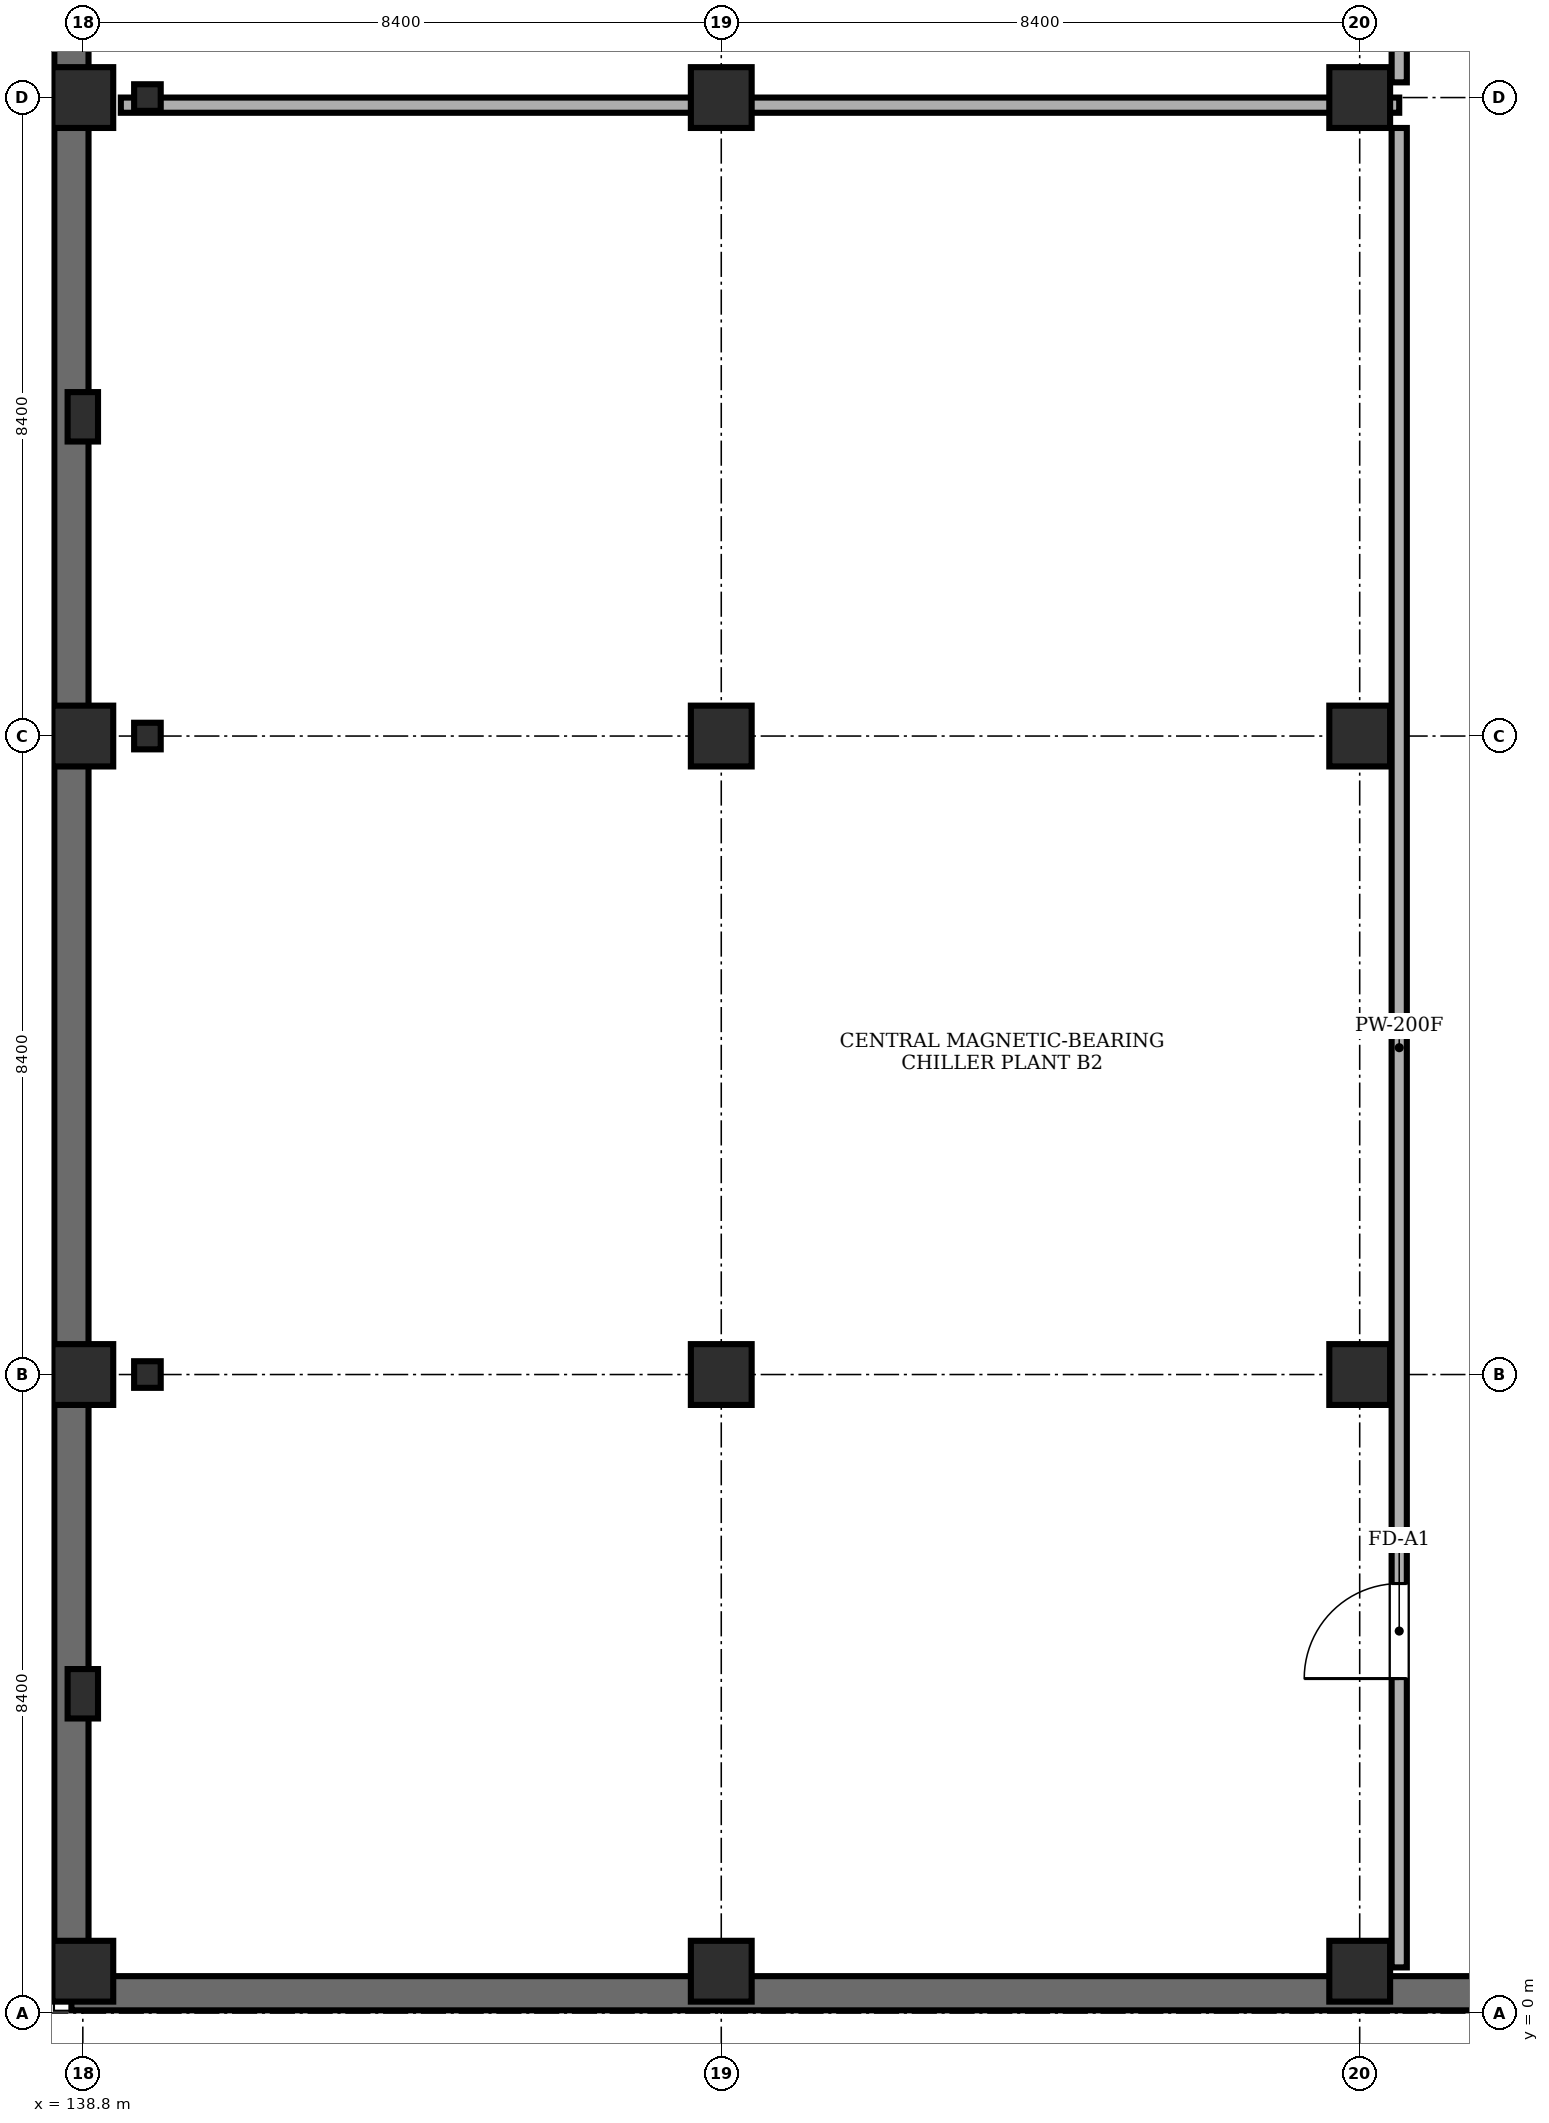
"""IFC4 building model, lengths in metres.
Left out: names, types, materials, properties, quantities, classifications, styles, units other than length and angle.
Written with IfcOpenShell. Run it as: python <this file> out.ifc"""

import sys

from ifc_helpers import new_model, si_unit, direction, frame, frame_2d, origin, origin_2d, place, context, subcontext, project, spatial, rectangle, i_section, extrude, element, fill, save


model = new_model("IFC4")
c1 = context("Model", 3, precision=1e-05, world=origin(), true_north=direction((0.0, 1.0)))
c2 = subcontext(c1, "Body", "Model", "MODEL_VIEW")
j1 = project(units=[si_unit("LENGTHUNIT", "METRE"), si_unit("PLANEANGLEUNIT", "RADIAN")], contexts=[c1])
p1 = place(None, origin())
s1 = spatial("IfcSite", under=j1, at=p1, CompositionType="ELEMENT")
p2 = place(p1, origin())
s2 = spatial("IfcBuilding", under=s1, at=p2, CompositionType="ELEMENT")
p3 = place(p2, frame((0.0, 0.0, -9.6)))
s3 = spatial("IfcBuildingStorey", under=s2, at=p3, CompositionType="ELEMENT", Elevation=-9.6)
for number, where, z_axis, x_axis in (
    (1, (138.8, 0.55, 0.0), (0.0, 0.0, 1.0), (1.0, 0.0, 0.0)),
    (2, (138.8, 8.4, 0.0), (0.0, 0.0, 1.0), (1.0, 0.0, 0.0)),
    (3, (138.8, 16.8, 0.0), (0.0, 0.0, 1.0), (1.0, 0.0, 0.0)),
    (4, (138.8, 25.2, 0.0), (0.0, 0.0, 1.0), (1.0, 0.0, 0.0)),
    (5, (147.2, 0.55, 0.0), (0.0, 0.0, 1.0), (1.0, 0.0, 0.0)),
    (6, (147.2, 8.4, 0.0), (0.0, 0.0, 1.0), (1.0, 0.0, 0.0)),
    (7, (147.2, 16.8, 0.0), (0.0, 0.0, 1.0), (1.0, 0.0, 0.0)),
    (8, (147.2, 25.2, 0.0), (0.0, 0.0, 1.0), (1.0, 0.0, 0.0)),
    (9, (155.6, 0.55, 0.0), (0.0, 0.0, 1.0), (1.0, 0.0, 0.0)),
    (10, (155.6, 8.4, 0.0), (0.0, 0.0, 1.0), (1.0, 0.0, 0.0)),
    (11, (155.6, 16.8, 0.0), (0.0, 0.0, 1.0), (1.0, 0.0, 0.0)),
    (12, (155.6, 25.2, 0.0), (0.0, 0.0, 1.0), (1.0, 0.0, 0.0)),
):
    element("IfcColumn", number, at=place(p3, frame(where, z_axis=z_axis, x_axis=x_axis)), inside=s3, PredefinedType="COLUMN", context=c2, shape_type="SweptSolid", body=[
        extrude(rectangle(XDim=0.8, YDim=0.8, at=origin_2d()), origin(), (0.0, 0.0, 1.0), 4.48),
    ])
for number, where, z_axis, x_axis in (
    (13, (138.8, 4.2, 0.0), (0.0, 0.0, 1.0), (1.0, 0.0, 0.0)),
    (14, (138.8, 21.0, 0.0), (0.0, 0.0, 1.0), (1.0, 0.0, 0.0)),
):
    element("IfcColumn", number, at=place(p3, frame(where, z_axis=z_axis, x_axis=x_axis)), inside=s3, PredefinedType="PILASTER", context=c2, shape_type="SweptSolid", body=[
        extrude(rectangle(XDim=0.4, YDim=0.65, at=origin_2d()), origin(), (0.0, 0.0, 1.0), 4.48),
    ])
p4 = place(p3, frame((138.65, 78.25, 0.0), z_axis=(0.0, 0.0, 1.0), x_axis=(0.0, -1.0, 0.0)))
e15 = element("IfcWall", 15, at=p4, inside=s3, PredefinedType="SHEAR", context=c2, shape_type="SweptSolid", body=[
    extrude(rectangle(XDim=77.99, YDim=0.45, at=frame_2d((38.995, 0.0))), origin(), (0.0, 0.0, 1.0), 3.7),
])
p5 = place(p3, frame((138.65, 0.26, 0.0), z_axis=(0.0, 0.0, 1.0), x_axis=(1.0, 0.0, 0.0)))
e16 = element("IfcWall", 16, at=p5, inside=s3, PredefinedType="SHEAR", context=c2, shape_type="SweptSolid", body=[
    extrude(rectangle(XDim=25.09, YDim=0.45, at=frame_2d((12.545, 0.0))), origin(), (0.0, 0.0, 1.0), 3.7),
])
for number, where, z_axis, x_axis in (
    (17, (139.65, 8.4, 0.0), (0.0, 0.0, 1.0), (1.0, 0.0, 0.0)),
    (18, (139.65, 16.8, 0.0), (0.0, 0.0, 1.0), (1.0, 0.0, 0.0)),
    (19, (139.65, 25.2, 0.0), (0.0, 0.0, 1.0), (1.0, 0.0, 0.0)),
):
    element("IfcColumn", number, at=place(p3, frame(where, z_axis=z_axis, x_axis=x_axis)), inside=s3, PredefinedType="COLUMN", context=c2, shape_type="SweptSolid", body=[
        extrude(i_section(OverallWidth=0.35, OverallDepth=0.35, WebThickness=0.012, FlangeThickness=0.019, at=origin_2d()), origin(), (0.0, 0.0, 1.0), 4.48),
    ])
p6 = place(p3, frame((156.12, 0.6, 0.0), z_axis=(0.0, 0.0, 1.0), x_axis=(0.0, 1.0, 0.0)))
e20 = element("IfcWall", 20, at=p6, inside=s3, PredefinedType="SOLIDWALL", context=c2, shape_type="SweptSolid", body=[
    extrude(rectangle(XDim=24.2, YDim=0.2, at=frame_2d((12.1, 0.0))), origin(), (0.0, 0.0, 1.0), 4.48),
])
p7 = place(p6, frame((3.8, 0.0, 0.0)))
e21 = element("IfcOpeningElement", 21, at=p7, cuts=e20, PredefinedType="OPENING", context=c2, shape_type="SweptSolid", body=[
    extrude(rectangle(XDim=1.25, YDim=2.2, at=frame_2d((0.625, 1.1))), frame((0.0, 0.11, 0.0), z_axis=(0.0, -1.0, 0.0), x_axis=(1.0, 0.0, 0.0)), (0.0, 0.0, 1.0), 0.22),
])
p8 = place(p3, frame((156.12, 25.4, 0.0), z_axis=(0.0, 0.0, 1.0), x_axis=(0.0, 1.0, 0.0)))
e22 = element("IfcWall", 22, at=p8, inside=s3, PredefinedType="SOLIDWALL", context=c2, shape_type="SweptSolid", body=[
    extrude(rectangle(XDim=16.2, YDim=0.2, at=frame_2d((8.1, 0.0))), origin(), (0.0, 0.0, 1.0), 4.48),
])
p9 = place(p8, frame((3.8, 0.0, 0.0)))
e23 = element("IfcOpeningElement", 23, at=p9, cuts=e22, PredefinedType="OPENING", context=c2, shape_type="SweptSolid", body=[
    extrude(rectangle(XDim=1.25, YDim=2.2, at=frame_2d((0.625, 1.1))), frame((0.0, 0.11, 0.0), z_axis=(0.0, -1.0, 0.0), x_axis=(1.0, 0.0, 0.0)), (0.0, 0.0, 1.0), 0.22),
])
p10 = place(p3, frame((139.3, 25.1, 0.0), z_axis=(0.0, 0.0, 1.0), x_axis=(1.0, 0.0, 0.0)))
e24 = element("IfcWall", 24, at=p10, inside=s3, PredefinedType="SOLIDWALL", context=c2, shape_type="SweptSolid", body=[
    extrude(rectangle(XDim=16.82, YDim=0.2, at=frame_2d((8.41, 0.0))), origin(), (0.0, 0.0, 1.0), 3.63),
])
p11 = place(p7, origin())
e25 = element("IfcDoor", 25, at=p11, inside=s3, OperationType="SINGLE_SWING_LEFT", PredefinedType="DOOR", context=c2, shape_type="SweptSolid", body=[
    extrude(rectangle(XDim=1.25, YDim=2.2, at=frame_2d((0.625, 1.1))), frame((0.0, 0.025, 0.0), z_axis=(0.0, -1.0, 0.0), x_axis=(1.0, 0.0, 0.0)), (0.0, 0.0, 1.0), 0.05),
])
fill(e21, e25)
save(model, sys.argv[1])
